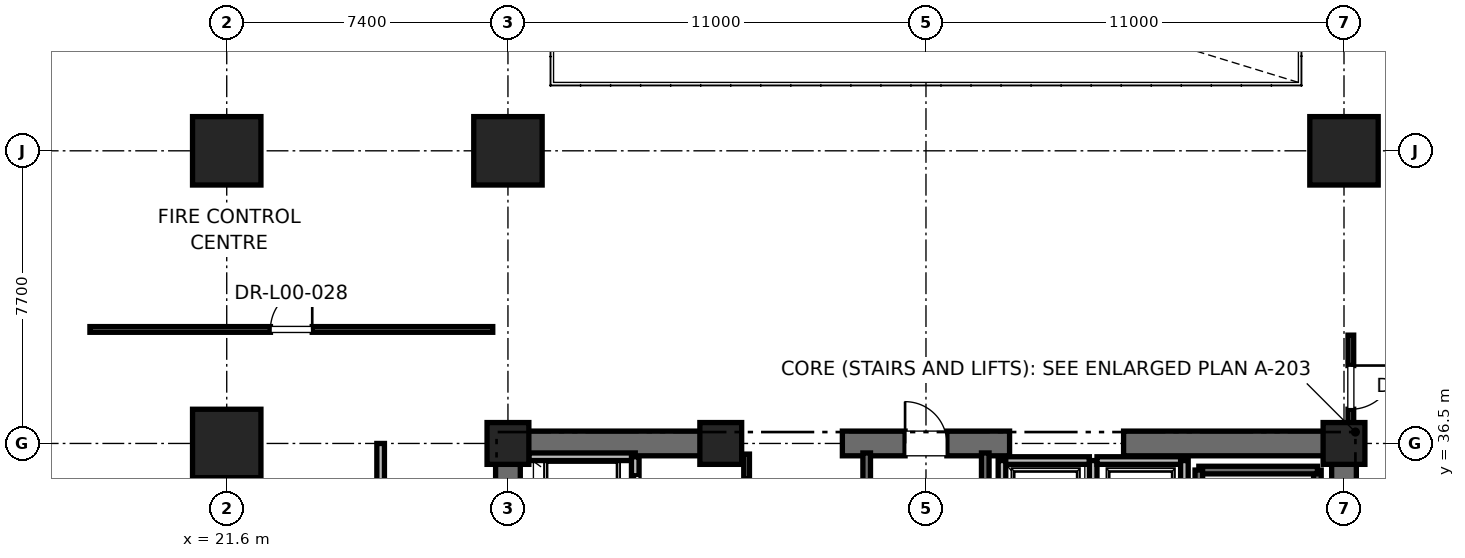
"""IFC4 building model, lengths in metres.
Left out: names, types, materials, properties, quantities, classifications, styles, units other than length and angle.
Written with IfcOpenShell. Run it as: python <this file> out.ifc"""

import sys

from ifc_helpers import new_model, si_unit, direction, frame, frame_2d, origin, origin_2d, place, context, subcontext, project, spatial, rectangle, extrude, element, fill, save


model = new_model("IFC4")
c1 = context("Model", 3, precision=1e-05, world=origin(), true_north=direction((0.0, 1.0)))
c2 = subcontext(c1, "Body", "Model", "MODEL_VIEW")
j1 = project(units=[si_unit("LENGTHUNIT", "METRE"), si_unit("PLANEANGLEUNIT", "RADIAN")], contexts=[c1])
p1 = place(None, origin())
s1 = spatial("IfcSite", under=j1, at=p1, CompositionType="ELEMENT")
p2 = place(p1, origin())
s2 = spatial("IfcBuilding", under=s1, at=p2, CompositionType="ELEMENT")
p3 = place(p2, origin())
s3 = spatial("IfcBuildingStorey", under=s2, at=p3, CompositionType="ELEMENT", Elevation=0.0)
for number, where, z_axis, x_axis in (
    (1, (29.0, 44.2, 0.0), (0.0, 0.0, 1.0), (1.0, 0.0, 0.0)),
    (2, (51.0, 44.2, 0.0), (0.0, 0.0, 1.0), (1.0, 0.0, 0.0)),
    (3, (21.6, 36.5, 0.0), (0.0, 0.0, 1.0), (1.0, 0.0, 0.0)),
    (4, (21.6, 44.2, 0.0), (0.0, 0.0, 1.0), (1.0, 0.0, 0.0)),
):
    element("IfcColumn", number, at=place(p3, frame(where, z_axis=z_axis, x_axis=x_axis)), inside=s3, PredefinedType="COLUMN", context=c2, shape_type="SweptSolid", body=[
        extrude(rectangle(XDim=1.8, YDim=1.8, at=origin_2d()), origin(), (0.0, 0.0, 1.0), 6.0),
    ])
for number, where, z_axis, x_axis in (
    (5, (29.0, 36.5, 0.0), (0.0, 0.0, 1.0), (1.0, 0.0, 0.0)),
    (6, (51.0, 36.5, 0.0), (0.0, 0.0, 1.0), (1.0, 0.0, 0.0)),
    (7, (34.6, 36.5, 0.0), (0.0, 0.0, 1.0), (1.0, 0.0, 0.0)),
):
    element("IfcColumn", number, at=place(p3, frame(where, z_axis=z_axis, x_axis=x_axis)), inside=s3, PredefinedType="PILASTER", context=c2, shape_type="SweptSolid", body=[
        extrude(rectangle(XDim=1.1, YDim=1.1, at=origin_2d()), origin(), (0.0, 0.0, 1.0), 6.0),
    ])
p4 = place(p3, frame((29.0, 36.5, 0.0), z_axis=(0.0, 0.0, 1.0), x_axis=(1.0, 0.0, 0.0)))
e8 = element("IfcWall", 8, at=p4, inside=s3, PredefinedType="SHEAR", context=c2, shape_type="SweptSolid", body=[
    extrude(rectangle(XDim=5.8, YDim=0.65, at=frame_2d((2.9, 0.0))), origin(), (0.0, 0.0, 1.0), 5.72),
])
p5 = place(p3, frame((37.8, 36.5, 0.0), z_axis=(0.0, 0.0, 1.0), x_axis=(1.0, 0.0, 0.0)))
e9 = element("IfcWall", 9, at=p5, inside=s3, PredefinedType="SHEAR", context=c2, shape_type="SweptSolid", body=[
    extrude(rectangle(XDim=4.4, YDim=0.65, at=frame_2d((2.2, 0.0))), origin(), (0.0, 0.0, 1.0), 5.72),
])
p6 = place(p5, frame((1.65, 0.0, 0.0)))
e10 = element("IfcOpeningElement", 10, at=p6, cuts=e9, PredefinedType="OPENING", context=c2, shape_type="SweptSolid", body=[
    extrude(rectangle(XDim=1.1, YDim=2.15, at=frame_2d((0.55, 1.075))), frame((0.0, 0.325, 0.0), z_axis=(0.0, -1.0, 0.0), x_axis=(1.0, 0.0, 0.0)), (0.0, 0.0, 1.0), 0.65),
])
for number, where, z_axis, x_axis in (
    (11, (45.2, 36.5, 0.0), (0.0, 0.0, 1.0), (1.0, 0.0, 0.0)),
    (12, (29.0, 30.7, 0.0), (0.0, 0.0, 1.0), (0.0, 1.0, 0.0)),
):
    element("IfcWall", number, at=place(p3, frame(where, z_axis=z_axis, x_axis=x_axis)), inside=s3, PredefinedType="SHEAR", context=c2, shape_type="SweptSolid", body=[
        extrude(rectangle(XDim=5.8, YDim=0.65, at=frame_2d((2.9, 0.0))), origin(), (0.0, 0.0, 1.0), 5.72),
    ])
p7 = place(p3, frame((51.0, 27.7, 0.0), z_axis=(0.0, 0.0, 1.0), x_axis=(0.0, 1.0, 0.0)))
e13 = element("IfcWall", 13, at=p7, inside=s3, PredefinedType="SHEAR", context=c2, shape_type="SweptSolid", body=[
    extrude(rectangle(XDim=8.8, YDim=0.65, at=frame_2d((4.4, 0.0))), origin(), (0.0, 0.0, 1.0), 5.72),
])
p8 = place(p3, frame((50.3, 27.65, 0.0), z_axis=(0.0, 0.0, 1.0), x_axis=(0.0, 1.0, 0.0)))
e14 = element("IfcWall", 14, at=p8, inside=s3, PredefinedType="SOLIDWALL", context=c2, shape_type="SweptSolid", body=[
    extrude(rectangle(XDim=8.15, YDim=0.2, at=frame_2d((4.075, 0.0))), origin(), (0.0, 0.0, 1.0), 5.72),
])
p9 = place(p3, frame((47.18, 35.8, 0.0), z_axis=(0.0, 0.0, 1.0), x_axis=(1.0, 0.0, 0.0)))
e15 = element("IfcWall", 15, at=p9, inside=s3, PredefinedType="SOLIDWALL", context=c2, shape_type="SweptSolid", body=[
    extrude(rectangle(XDim=3.12, YDim=0.2, at=frame_2d((1.56, 0.0))), origin(), (0.0, 0.0, 1.0), 5.72),
])
p10 = place(p3, frame((47.18, 27.62, 0.0), z_axis=(0.0, 0.0, 1.0), x_axis=(0.0, 1.0, 0.0)))
e16 = element("IfcWall", 16, at=p10, inside=s3, PredefinedType="SOLIDWALL", context=c2, shape_type="SweptSolid", body=[
    extrude(rectangle(XDim=8.18, YDim=0.2, at=frame_2d((4.09, 0.0))), origin(), (0.0, 0.0, 1.0), 5.72),
])
p11 = place(p3, frame((38.44, 27.38, 0.0), z_axis=(0.0, 0.0, 1.0), x_axis=(0.0, 1.0, 0.0)))
e17 = element("IfcWall", 17, at=p11, inside=s3, PredefinedType="SOLIDWALL", context=c2, shape_type="SweptSolid", body=[
    extrude(rectangle(XDim=8.87, YDim=0.2, at=frame_2d((4.435, 0.0))), origin(), (0.0, 0.0, 1.0), 5.72),
])
p12 = place(p3, frame((41.56, 27.68, 0.0), z_axis=(0.0, 0.0, 1.0), x_axis=(0.0, 1.0, 0.0)))
e18 = element("IfcWall", 18, at=p12, inside=s3, PredefinedType="SOLIDWALL", context=c2, shape_type="SweptSolid", body=[
    extrude(rectangle(XDim=8.57, YDim=0.2, at=frame_2d((4.285, 0.0))), origin(), (0.0, 0.0, 1.0), 5.72),
])
p13 = place(p3, frame((32.35, 36.15, 0.0), z_axis=(0.0, 0.0, 1.0), x_axis=(-1.0, 0.0, 0.0)))
e19 = element("IfcWall", 19, at=p13, inside=s3, PredefinedType="SOLIDWALL", context=c2, shape_type="SweptSolid", body=[
    extrude(rectangle(XDim=2.8, YDim=0.2, at=frame_2d((1.4, 0.0))), origin(), (0.0, 0.0, 1.0), 4.779),
])
p14 = place(p3, frame((32.35, 34.05, 0.0), z_axis=(0.0, 0.0, 1.0), x_axis=(0.0, 1.0, 0.0)))
e20 = element("IfcWall", 20, at=p14, inside=s3, PredefinedType="SOLIDWALL", context=c2, shape_type="SweptSolid", body=[
    extrude(rectangle(XDim=2.1, YDim=0.2, at=frame_2d((1.05, 0.0))), origin(), (0.0, 0.0, 1.0), 5.72),
])
p15 = place(p14, frame((0.5, 0.0, 0.0)))
e21 = element("IfcOpeningElement", 21, at=p15, cuts=e20, PredefinedType="OPENING", context=c2, shape_type="SweptSolid", body=[
    extrude(rectangle(XDim=1.1, YDim=2.2, at=frame_2d((0.55, 1.1))), frame((0.0, 0.1, 0.0), z_axis=(0.0, -1.0, 0.0), x_axis=(1.0, 0.0, 0.0)), (0.0, 0.0, 1.0), 0.2),
])
p16 = place(p3, frame((44.3, 36.05, 0.0), z_axis=(0.0, 0.0, 1.0), x_axis=(-1.0, 0.0, 0.0)))
e22 = element("IfcWall", 22, at=p16, inside=s3, PredefinedType="SOLIDWALL", context=c2, shape_type="SweptSolid", body=[
    extrude(rectangle(XDim=2.3, YDim=0.2, at=frame_2d((1.15, 0.0))), origin(), (0.0, 0.0, 1.0), 4.5),
])
for number, where, z_axis, x_axis in (
    (23, (42.0, 36.05, 0.0), (0.0, 0.0, 1.0), (0.0, -1.0, 0.0)),
    (24, (44.4, 33.45, 0.0), (0.0, 0.0, 1.0), (0.0, 1.0, 0.0)),
):
    element("IfcWall", number, at=place(p3, frame(where, z_axis=z_axis, x_axis=x_axis)), inside=s3, PredefinedType="SOLIDWALL", context=c2, shape_type="SweptSolid", body=[
        extrude(rectangle(XDim=2.6, YDim=0.2, at=frame_2d((1.3, 0.0))), origin(), (0.0, 0.0, 1.0), 4.5),
    ])
p17 = place(p3, frame((46.8, 36.05, 0.0), z_axis=(0.0, 0.0, 1.0), x_axis=(-1.0, 0.0, 0.0)))
e25 = element("IfcWall", 25, at=p17, inside=s3, PredefinedType="SOLIDWALL", context=c2, shape_type="SweptSolid", body=[
    extrude(rectangle(XDim=2.3, YDim=0.2, at=frame_2d((1.15, 0.0))), origin(), (0.0, 0.0, 1.0), 4.5),
])
p18 = place(p3, frame((46.8, 33.45, 0.0), z_axis=(0.0, 0.0, 1.0), x_axis=(0.0, 1.0, 0.0)))
e26 = element("IfcWall", 26, at=p18, inside=s3, PredefinedType="SOLIDWALL", context=c2, shape_type="SweptSolid", body=[
    extrude(rectangle(XDim=2.6, YDim=0.2, at=frame_2d((1.3, 0.0))), origin(), (0.0, 0.0, 1.0), 5.72),
])
p19 = place(p3, frame((35.28, 33.95, 0.0), z_axis=(0.0, 0.0, 1.0), x_axis=(0.0, 1.0, 0.0)))
e27 = element("IfcWall", 27, at=p19, inside=s3, PredefinedType="PARTITIONING", context=c2, shape_type="SweptSolid", body=[
    extrude(rectangle(XDim=2.27, YDim=0.15, at=frame_2d((1.135, 0.0))), origin(), (0.0, 0.0, 1.0), 2.85),
])
p20 = place(p19, frame((0.66, 0.0, 0.0)))
e28 = element("IfcOpeningElement", 28, at=p20, cuts=e27, PredefinedType="OPENING", context=c2, shape_type="SweptSolid", body=[
    extrude(rectangle(XDim=0.95, YDim=2.15, at=frame_2d((0.475, 1.075))), frame((0.0, 0.075, 0.0), z_axis=(0.0, -1.0, 0.0), x_axis=(1.0, 0.0, 0.0)), (0.0, 0.0, 1.0), 0.15),
])
p21 = place(p3, frame((51.18, 39.35, 0.0), z_axis=(0.0, 0.0, 1.0), x_axis=(0.0, -1.0, 0.0)))
e29 = element("IfcWall", 29, at=p21, inside=s3, PredefinedType="PARTITIONING", context=c2, shape_type="SweptSolid", body=[
    extrude(rectangle(XDim=2.75, YDim=0.15, at=frame_2d((1.375, 0.0))), origin(), (0.0, 0.0, 1.0), 2.85),
])
p22 = place(p21, frame((0.8, 0.0, 0.0)))
e30 = element("IfcOpeningElement", 30, at=p22, cuts=e29, PredefinedType="OPENING", context=c2, shape_type="SweptSolid", body=[
    extrude(rectangle(XDim=1.15, YDim=2.2, at=frame_2d((0.575, 1.1))), frame((0.0, 0.075, 0.0), z_axis=(0.0, -1.0, 0.0), x_axis=(1.0, 0.0, 0.0)), (0.0, 0.0, 1.0), 0.15),
])
p23 = place(p3, frame((25.65, -1.35, 0.0), z_axis=(0.0, 0.0, 1.0), x_axis=(0.0, 1.0, 0.0)))
e31 = element("IfcWall", 31, at=p23, inside=s3, PredefinedType="PARTITIONING", context=c2, shape_type="SweptSolid", body=[
    extrude(rectangle(XDim=37.85, YDim=0.2, at=frame_2d((18.925, 0.0))), origin(), (0.0, 0.0, 1.0), 2.85),
])
p24 = place(p23, frame((17.775, 0.0, 0.0)))
e32 = element("IfcOpeningElement", 32, at=p24, cuts=e31, PredefinedType="OPENING", context=c2, shape_type="SweptSolid", body=[
    extrude(rectangle(XDim=1.15, YDim=2.2, at=frame_2d((0.575, 1.1))), frame((0.0, 0.1, 0.0), z_axis=(0.0, -1.0, 0.0), x_axis=(1.0, 0.0, 0.0)), (0.0, 0.0, 1.0), 0.2),
])
p25 = place(p3, frame((18.0, 39.5, 0.0), z_axis=(0.0, 0.0, 1.0), x_axis=(1.0, 0.0, 0.0)))
e33 = element("IfcWall", 33, at=p25, inside=s3, PredefinedType="PARTITIONING", context=c2, shape_type="SweptSolid", body=[
    extrude(rectangle(XDim=10.6, YDim=0.15, at=frame_2d((5.3, 0.0))), origin(), (0.0, 0.0, 1.0), 2.85),
])
p26 = place(p25, frame((4.75, 0.0, 0.0)))
e34 = element("IfcOpeningElement", 34, at=p26, cuts=e33, PredefinedType="OPENING", context=c2, shape_type="SweptSolid", body=[
    extrude(rectangle(XDim=1.1, YDim=2.15, at=frame_2d((0.55, 1.075))), frame((0.0, 0.075, 0.0), z_axis=(0.0, -1.0, 0.0), x_axis=(1.0, 0.0, 0.0)), (0.0, 0.0, 1.0), 0.15),
])
p27 = place(p6, origin())
e35 = element("IfcDoor", 35, at=p27, inside=s3, OperationType="SINGLE_SWING_LEFT", PredefinedType="DOOR", context=c2, shape_type="SweptSolid", body=[
    extrude(rectangle(XDim=1.1, YDim=2.15, at=frame_2d((0.55, 1.075))), frame((0.0, 0.025, 0.0), z_axis=(0.0, -1.0, 0.0), x_axis=(1.0, 0.0, 0.0)), (0.0, 0.0, 1.0), 0.05),
])
fill(e10, e35)
p28 = place(p15, origin())
e36 = element("IfcDoor", 36, at=p28, inside=s3, OperationType="SLIDING_TO_RIGHT", PredefinedType="DOOR", context=c2, shape_type="SweptSolid", body=[
    extrude(rectangle(XDim=1.1, YDim=2.2, at=frame_2d((0.55, 1.1))), frame((0.0, 0.025, 0.0), z_axis=(0.0, -1.0, 0.0), x_axis=(1.0, 0.0, 0.0)), (0.0, 0.0, 1.0), 0.05),
])
fill(e21, e36)
p29 = place(p22, origin())
e37 = element("IfcDoor", 37, at=p29, inside=s3, OperationType="SINGLE_SWING_LEFT", PredefinedType="DOOR", context=c2, shape_type="SweptSolid", body=[
    extrude(rectangle(XDim=1.15, YDim=2.2, at=frame_2d((0.575, 1.1))), frame((0.0, 0.025, 0.0), z_axis=(0.0, -1.0, 0.0), x_axis=(1.0, 0.0, 0.0)), (0.0, 0.0, 1.0), 0.05),
])
fill(e30, e37)
p30 = place(p26, origin())
e38 = element("IfcDoor", 38, at=p30, inside=s3, OperationType="SINGLE_SWING_RIGHT", PredefinedType="DOOR", context=c2, shape_type="SweptSolid", body=[
    extrude(rectangle(XDim=1.1, YDim=2.15, at=frame_2d((0.55, 1.075))), frame((0.0, 0.025, 0.0), z_axis=(0.0, -1.0, 0.0), x_axis=(1.0, 0.0, 0.0)), (0.0, 0.0, 1.0), 0.05),
])
fill(e34, e38)
save(model, sys.argv[1])
